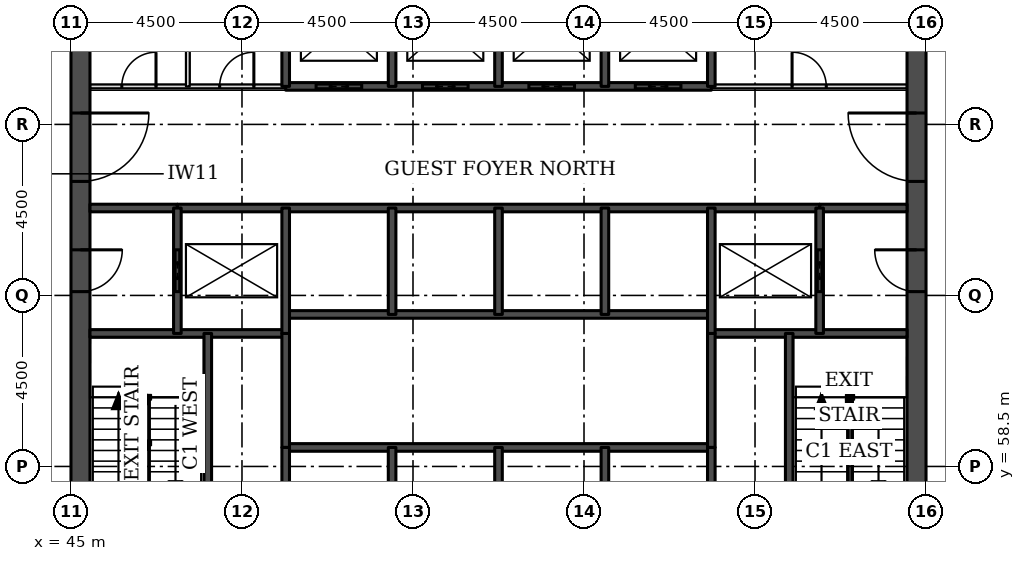
"""IFC4 building model, lengths in metres.
Left out: names, types, materials, properties, quantities, classifications, styles, units other than length and angle.
Written with IfcOpenShell. Run it as: python <this file> out.ifc"""

import sys

from ifc_helpers import new_model, si_unit, direction, frame, frame_2d, origin, place, context, subcontext, project, spatial, rectangle, extrude, element, fill, save


model = new_model("IFC4")
c1 = context("Model", 3, precision=1e-05, world=origin(), true_north=direction((0.0, 1.0)))
c2 = subcontext(c1, "Body", "Model", "MODEL_VIEW")
j1 = project(units=[si_unit("LENGTHUNIT", "METRE"), si_unit("PLANEANGLEUNIT", "RADIAN")], contexts=[c1])
p1 = place(None, origin())
s1 = spatial("IfcSite", under=j1, at=p1, CompositionType="ELEMENT")
p2 = place(p1, origin())
s2 = spatial("IfcBuilding", under=s1, at=p2, CompositionType="ELEMENT")
p3 = place(p2, frame((0.0, 0.0, 59.4)))
s3 = spatial("IfcBuildingStorey", under=s2, at=p3, CompositionType="ELEMENT", Elevation=59.4)
p4 = place(p3, frame((45.25, 49.5, 0.0), z_axis=(0.0, 0.0, 1.0), x_axis=(0.0, 1.0, 0.0)))
e1 = element("IfcWall", 1, at=p4, inside=s3, PredefinedType="SHEAR", context=c2, shape_type="SweptSolid", body=[
    extrude(rectangle(XDim=22.5, YDim=0.5, at=frame_2d((11.25, 0.0))), origin(), (0.0, 0.0, 1.0), 3.3),
])
p5 = place(p4, frame((4.2, 0.0, 0.0)))
e2 = element("IfcOpeningElement", 2, at=p5, cuts=e1, PredefinedType="OPENING", context=c2, shape_type="SweptSolid", body=[
    extrude(rectangle(XDim=1.8, YDim=2.1, at=frame_2d((0.9, 1.05))), frame((0.0, 0.26, 0.0), z_axis=(0.0, -1.0, 0.0), x_axis=(1.0, 0.0, 0.0)), (0.0, 0.0, 1.0), 0.52),
])
p6 = place(p4, frame((6.9, 0.0, 0.0)))
e3 = element("IfcOpeningElement", 3, at=p6, cuts=e1, PredefinedType="OPENING", context=c2, shape_type="SweptSolid", body=[
    extrude(rectangle(XDim=1.1, YDim=2.1, at=frame_2d((0.55, 1.05))), frame((0.0, 0.26, 0.0), z_axis=(0.0, -1.0, 0.0), x_axis=(1.0, 0.0, 0.0)), (0.0, 0.0, 1.0), 0.52),
])
p7 = place(p4, frame((13.6, 0.0, 0.0)))
e4 = element("IfcOpeningElement", 4, at=p7, cuts=e1, PredefinedType="OPENING", context=c2, shape_type="SweptSolid", body=[
    extrude(rectangle(XDim=1.1, YDim=2.1, at=frame_2d((0.55, 1.05))), frame((0.0, 0.26, 0.0), z_axis=(0.0, -1.0, 0.0), x_axis=(1.0, 0.0, 0.0)), (0.0, 0.0, 1.0), 0.52),
])
p8 = place(p4, frame((16.5, 0.0, 0.0)))
e5 = element("IfcOpeningElement", 5, at=p8, cuts=e1, PredefinedType="OPENING", context=c2, shape_type="SweptSolid", body=[
    extrude(rectangle(XDim=1.8, YDim=2.1, at=frame_2d((0.9, 1.05))), frame((0.0, 0.26, 0.0), z_axis=(0.0, -1.0, 0.0), x_axis=(1.0, 0.0, 0.0)), (0.0, 0.0, 1.0), 0.52),
])
p9 = place(p3, frame((67.25, 49.5, 0.0), z_axis=(0.0, 0.0, 1.0), x_axis=(0.0, 1.0, 0.0)))
e6 = element("IfcWall", 6, at=p9, inside=s3, PredefinedType="SHEAR", context=c2, shape_type="SweptSolid", body=[
    extrude(rectangle(XDim=22.5, YDim=0.5, at=frame_2d((11.25, 0.0))), origin(), (0.0, 0.0, 1.0), 3.3),
])
p10 = place(p9, frame((4.2, 0.0, 0.0)))
e7 = element("IfcOpeningElement", 7, at=p10, cuts=e6, PredefinedType="OPENING", context=c2, shape_type="SweptSolid", body=[
    extrude(rectangle(XDim=1.8, YDim=2.1, at=frame_2d((0.9, 1.05))), frame((0.0, 0.26, 0.0), z_axis=(0.0, -1.0, 0.0), x_axis=(1.0, 0.0, 0.0)), (0.0, 0.0, 1.0), 0.52),
])
p11 = place(p9, frame((6.9, 0.0, 0.0)))
e8 = element("IfcOpeningElement", 8, at=p11, cuts=e6, PredefinedType="OPENING", context=c2, shape_type="SweptSolid", body=[
    extrude(rectangle(XDim=1.1, YDim=2.1, at=frame_2d((0.55, 1.05))), frame((0.0, 0.26, 0.0), z_axis=(0.0, -1.0, 0.0), x_axis=(1.0, 0.0, 0.0)), (0.0, 0.0, 1.0), 0.52),
])
p12 = place(p9, frame((13.6, 0.0, 0.0)))
e9 = element("IfcOpeningElement", 9, at=p12, cuts=e6, PredefinedType="OPENING", context=c2, shape_type="SweptSolid", body=[
    extrude(rectangle(XDim=1.1, YDim=2.1, at=frame_2d((0.55, 1.05))), frame((0.0, 0.26, 0.0), z_axis=(0.0, -1.0, 0.0), x_axis=(1.0, 0.0, 0.0)), (0.0, 0.0, 1.0), 0.52),
])
p13 = place(p9, frame((16.5, 0.0, 0.0)))
e10 = element("IfcOpeningElement", 10, at=p13, cuts=e6, PredefinedType="OPENING", context=c2, shape_type="SweptSolid", body=[
    extrude(rectangle(XDim=1.8, YDim=2.1, at=frame_2d((0.9, 1.05))), frame((0.0, 0.26, 0.0), z_axis=(0.0, -1.0, 0.0), x_axis=(1.0, 0.0, 0.0)), (0.0, 0.0, 1.0), 0.52),
])
p14 = place(p3, frame((50.65, 59.0, 0.0), z_axis=(0.0, 0.0, 1.0), x_axis=(1.0, 0.0, 0.0)))
e11 = element("IfcWall", 11, at=p14, inside=s3, PredefinedType="SOLIDWALL", context=c2, shape_type="SweptSolid", body=[
    extrude(rectangle(XDim=11.2, YDim=0.2, at=frame_2d((5.6, 0.0))), origin(), (0.0, 0.0, 1.0), 3.3),
])
for number, where, z_axis, x_axis in (
    (12, (45.5, 62.0, 0.0), (0.0, 0.0, 1.0), (1.0, 0.0, 0.0)),
    (13, (61.85, 62.0, 0.0), (0.0, 0.0, 1.0), (1.0, 0.0, 0.0)),
):
    element("IfcWall", number, at=place(p3, frame(where, z_axis=z_axis, x_axis=x_axis)), inside=s3, PredefinedType="SOLIDWALL", context=c2, shape_type="SweptSolid", body=[
        extrude(rectangle(XDim=5.15, YDim=0.2, at=frame_2d((2.575, 0.0))), origin(), (0.0, 0.0, 1.0), 3.08),
    ])
p15 = place(p3, frame((50.65, 62.5, 0.0), z_axis=(0.0, 0.0, 1.0), x_axis=(1.0, 0.0, 0.0)))
e14 = element("IfcWall", 14, at=p15, inside=s3, PredefinedType="SOLIDWALL", context=c2, shape_type="SweptSolid", body=[
    extrude(rectangle(XDim=11.2, YDim=0.2, at=frame_2d((5.6, 0.0))), origin(), (0.0, 0.0, 1.0), 3.3),
])
for number, where, z_axis, x_axis in (
    (15, (45.5, 65.3, 0.0), (0.0, 0.0, 1.0), (1.0, 0.0, 0.0)),
    (16, (64.7, 65.3, 0.0), (0.0, 0.0, 1.0), (1.0, 0.0, 0.0)),
):
    element("IfcWall", number, at=place(p3, frame(where, z_axis=z_axis, x_axis=x_axis)), inside=s3, PredefinedType="SOLIDWALL", context=c2, shape_type="SweptSolid", body=[
        extrude(rectangle(XDim=2.3, YDim=0.2, at=frame_2d((1.15, 0.0))), origin(), (0.0, 0.0, 1.0), 3.08),
    ])
p16 = place(p3, frame((47.8, 65.3, 0.0), z_axis=(0.0, 0.0, 1.0), x_axis=(1.0, 0.0, 0.0)))
e17 = element("IfcWall", 17, at=p16, inside=s3, PredefinedType="SOLIDWALL", context=c2, shape_type="SweptSolid", body=[
    extrude(rectangle(XDim=16.9, YDim=0.2, at=frame_2d((8.45, 0.0))), origin(), (0.0, 0.0, 1.0), 3.08),
])
p17 = place(p3, frame((45.5, 68.5, 0.0), z_axis=(0.0, 0.0, 1.0), x_axis=(1.0, 0.0, 0.0)))
e18 = element("IfcWall", 18, at=p17, inside=s3, PredefinedType="PARTITIONING", context=c2, shape_type="SweptSolid", body=[
    extrude(rectangle(XDim=5.15, YDim=0.1, at=frame_2d((2.575, 0.0))), origin(), (0.0, 0.0, 1.0), 3.08),
])
p18 = place(p17, frame((0.837, 0.0, 0.0)))
e19 = element("IfcOpeningElement", 19, at=p18, cuts=e18, PredefinedType="OPENING", context=c2, shape_type="SweptSolid", body=[
    extrude(rectangle(XDim=0.9, YDim=2.1, at=frame_2d((0.45, 1.05))), frame((0.0, 0.06, 0.0), z_axis=(0.0, -1.0, 0.0), x_axis=(1.0, 0.0, 0.0)), (0.0, 0.0, 1.0), 0.12),
])
p19 = place(p17, frame((3.413, 0.0, 0.0)))
e20 = element("IfcOpeningElement", 20, at=p19, cuts=e18, PredefinedType="OPENING", context=c2, shape_type="SweptSolid", body=[
    extrude(rectangle(XDim=0.9, YDim=2.1, at=frame_2d((0.45, 1.05))), frame((0.0, 0.06, 0.0), z_axis=(0.0, -1.0, 0.0), x_axis=(1.0, 0.0, 0.0)), (0.0, 0.0, 1.0), 0.12),
])
p20 = place(p3, frame((61.85, 68.5, 0.0), z_axis=(0.0, 0.0, 1.0), x_axis=(1.0, 0.0, 0.0)))
e21 = element("IfcWall", 21, at=p20, inside=s3, PredefinedType="PARTITIONING", context=c2, shape_type="SweptSolid", body=[
    extrude(rectangle(XDim=5.15, YDim=0.1, at=frame_2d((2.575, 0.0))), origin(), (0.0, 0.0, 1.0), 3.08),
])
p21 = place(p20, frame((2.125, 0.0, 0.0)))
e22 = element("IfcOpeningElement", 22, at=p21, cuts=e21, PredefinedType="OPENING", context=c2, shape_type="SweptSolid", body=[
    extrude(rectangle(XDim=0.9, YDim=2.1, at=frame_2d((0.45, 1.05))), frame((0.0, 0.06, 0.0), z_axis=(0.0, -1.0, 0.0), x_axis=(1.0, 0.0, 0.0)), (0.0, 0.0, 1.0), 0.12),
])
p22 = place(p3, frame((50.65, 68.5, 0.0), z_axis=(0.0, 0.0, 1.0), x_axis=(1.0, 0.0, 0.0)))
e23 = element("IfcWall", 23, at=p22, inside=s3, PredefinedType="SOLIDWALL", context=c2, shape_type="SweptSolid", body=[
    extrude(rectangle(XDim=11.2, YDim=0.2, at=frame_2d((5.6, 0.0))), origin(), (0.0, 0.0, 1.0), 3.08),
])
p23 = place(p22, frame((0.8, 0.0, 0.0)))
e24 = element("IfcOpeningElement", 24, at=p23, cuts=e23, PredefinedType="OPENING", context=c2, shape_type="SweptSolid", body=[
    extrude(rectangle(XDim=1.2, YDim=2.1, at=frame_2d((0.6, 1.05))), frame((0.0, 0.11, 0.0), z_axis=(0.0, -1.0, 0.0), x_axis=(1.0, 0.0, 0.0)), (0.0, 0.0, 1.0), 0.22),
])
p24 = place(p22, frame((3.6, 0.0, 0.0)))
e25 = element("IfcOpeningElement", 25, at=p24, cuts=e23, PredefinedType="OPENING", context=c2, shape_type="SweptSolid", body=[
    extrude(rectangle(XDim=1.2, YDim=2.1, at=frame_2d((0.6, 1.05))), frame((0.0, 0.11, 0.0), z_axis=(0.0, -1.0, 0.0), x_axis=(1.0, 0.0, 0.0)), (0.0, 0.0, 1.0), 0.22),
])
p25 = place(p22, frame((6.4, 0.0, 0.0)))
e26 = element("IfcOpeningElement", 26, at=p25, cuts=e23, PredefinedType="OPENING", context=c2, shape_type="SweptSolid", body=[
    extrude(rectangle(XDim=1.2, YDim=2.1, at=frame_2d((0.6, 1.05))), frame((0.0, 0.11, 0.0), z_axis=(0.0, -1.0, 0.0), x_axis=(1.0, 0.0, 0.0)), (0.0, 0.0, 1.0), 0.22),
])
p26 = place(p22, frame((9.2, 0.0, 0.0)))
e27 = element("IfcOpeningElement", 27, at=p26, cuts=e23, PredefinedType="OPENING", context=c2, shape_type="SweptSolid", body=[
    extrude(rectangle(XDim=1.2, YDim=2.1, at=frame_2d((0.6, 1.05))), frame((0.0, 0.11, 0.0), z_axis=(0.0, -1.0, 0.0), x_axis=(1.0, 0.0, 0.0)), (0.0, 0.0, 1.0), 0.22),
])
p27 = place(p3, frame((47.8, 62.0, 0.0), z_axis=(0.0, 0.0, 1.0), x_axis=(0.0, 1.0, 0.0)))
e28 = element("IfcWall", 28, at=p27, inside=s3, PredefinedType="SOLIDWALL", context=c2, shape_type="SweptSolid", body=[
    extrude(rectangle(XDim=3.3, YDim=0.2, at=frame_2d((1.65, 0.0))), origin(), (0.0, 0.0, 1.0), 3.08),
])
p28 = place(p27, frame((1.1, 0.0, 0.0)))
e29 = element("IfcOpeningElement", 29, at=p28, cuts=e28, PredefinedType="OPENING", context=c2, shape_type="SweptSolid", body=[
    extrude(rectangle(XDim=1.1, YDim=2.1, at=frame_2d((0.55, 1.05))), frame((0.0, 0.11, 0.0), z_axis=(0.0, -1.0, 0.0), x_axis=(1.0, 0.0, 0.0)), (0.0, 0.0, 1.0), 0.22),
])
p29 = place(p3, frame((48.075, 68.5, 0.0), z_axis=(0.0, 0.0, 1.0), x_axis=(0.0, 1.0, 0.0)))
e30 = element("IfcWall", 30, at=p29, inside=s3, PredefinedType="PARTITIONING", context=c2, shape_type="SweptSolid", body=[
    extrude(rectangle(XDim=3.0, YDim=0.1, at=frame_2d((1.5, 0.0))), origin(), (0.0, 0.0, 1.0), 3.08),
])
p30 = place(p3, frame((48.6, 56.2, 0.0), z_axis=(0.0, 0.0, 1.0), x_axis=(0.0, 1.0, 0.0)))
e31 = element("IfcWall", 31, at=p30, inside=s3, PredefinedType="SOLIDWALL", context=c2, shape_type="SweptSolid", body=[
    extrude(rectangle(XDim=5.8, YDim=0.2, at=frame_2d((2.9, 0.0))), origin(), (0.0, 0.0, 1.0), 3.08),
])
p31 = place(p3, frame((50.65, 59.0, 0.0), z_axis=(0.0, 0.0, 1.0), x_axis=(0.0, 1.0, 0.0)))
e32 = element("IfcWall", 32, at=p31, inside=s3, PredefinedType="SOLIDWALL", context=c2, shape_type="SweptSolid", body=[
    extrude(rectangle(XDim=3.0, YDim=0.2, at=frame_2d((1.5, 0.0))), origin(), (0.0, 0.0, 1.0), 3.3),
])
p32 = place(p3, frame((50.65, 56.2, 0.0), z_axis=(0.0, 0.0, 1.0), x_axis=(0.0, 1.0, 0.0)))
e33 = element("IfcWall", 33, at=p32, inside=s3, PredefinedType="SOLIDWALL", context=c2, shape_type="SweptSolid", body=[
    extrude(rectangle(XDim=2.8, YDim=0.2, at=frame_2d((1.4, 0.0))), origin(), (0.0, 0.0, 1.0), 3.08),
])
p33 = place(p3, frame((50.65, 62.0, 0.0), z_axis=(0.0, 0.0, 1.0), x_axis=(0.0, 1.0, 0.0)))
e34 = element("IfcWall", 34, at=p33, inside=s3, PredefinedType="SOLIDWALL", context=c2, shape_type="SweptSolid", body=[
    extrude(rectangle(XDim=3.3, YDim=0.2, at=frame_2d((1.65, 0.0))), origin(), (0.0, 0.0, 1.0), 3.08),
])
p34 = place(p3, frame((50.65, 68.5, 0.0), z_axis=(0.0, 0.0, 1.0), x_axis=(0.0, 1.0, 0.0)))
e35 = element("IfcWall", 35, at=p34, inside=s3, PredefinedType="SOLIDWALL", context=c2, shape_type="SweptSolid", body=[
    extrude(rectangle(XDim=3.0, YDim=0.2, at=frame_2d((1.5, 0.0))), origin(), (0.0, 0.0, 1.0), 3.08),
])
for number, where, z_axis, x_axis in (
    (36, (53.45, 56.2, 0.0), (0.0, 0.0, 1.0), (0.0, 1.0, 0.0)),
    (37, (53.45, 62.5, 0.0), (0.0, 0.0, 1.0), (0.0, 1.0, 0.0)),
):
    element("IfcWall", number, at=place(p3, frame(where, z_axis=z_axis, x_axis=x_axis)), inside=s3, PredefinedType="SOLIDWALL", context=c2, shape_type="SweptSolid", body=[
        extrude(rectangle(XDim=2.8, YDim=0.2, at=frame_2d((1.4, 0.0))), origin(), (0.0, 0.0, 1.0), 3.08),
    ])
p35 = place(p3, frame((53.45, 68.5, 0.0), z_axis=(0.0, 0.0, 1.0), x_axis=(0.0, 1.0, 0.0)))
e38 = element("IfcWall", 38, at=p35, inside=s3, PredefinedType="SOLIDWALL", context=c2, shape_type="SweptSolid", body=[
    extrude(rectangle(XDim=3.0, YDim=0.2, at=frame_2d((1.5, 0.0))), origin(), (0.0, 0.0, 1.0), 3.08),
])
for number, where, z_axis, x_axis in (
    (39, (56.25, 56.2, 0.0), (0.0, 0.0, 1.0), (0.0, 1.0, 0.0)),
    (40, (56.25, 62.5, 0.0), (0.0, 0.0, 1.0), (0.0, 1.0, 0.0)),
):
    element("IfcWall", number, at=place(p3, frame(where, z_axis=z_axis, x_axis=x_axis)), inside=s3, PredefinedType="SOLIDWALL", context=c2, shape_type="SweptSolid", body=[
        extrude(rectangle(XDim=2.8, YDim=0.2, at=frame_2d((1.4, 0.0))), origin(), (0.0, 0.0, 1.0), 3.08),
    ])
p36 = place(p3, frame((56.25, 68.5, 0.0), z_axis=(0.0, 0.0, 1.0), x_axis=(0.0, 1.0, 0.0)))
e41 = element("IfcWall", 41, at=p36, inside=s3, PredefinedType="SOLIDWALL", context=c2, shape_type="SweptSolid", body=[
    extrude(rectangle(XDim=3.0, YDim=0.2, at=frame_2d((1.5, 0.0))), origin(), (0.0, 0.0, 1.0), 3.08),
])
for number, where, z_axis, x_axis in (
    (42, (59.05, 56.2, 0.0), (0.0, 0.0, 1.0), (0.0, 1.0, 0.0)),
    (43, (59.05, 62.5, 0.0), (0.0, 0.0, 1.0), (0.0, 1.0, 0.0)),
):
    element("IfcWall", number, at=place(p3, frame(where, z_axis=z_axis, x_axis=x_axis)), inside=s3, PredefinedType="SOLIDWALL", context=c2, shape_type="SweptSolid", body=[
        extrude(rectangle(XDim=2.8, YDim=0.2, at=frame_2d((1.4, 0.0))), origin(), (0.0, 0.0, 1.0), 3.08),
    ])
p37 = place(p3, frame((59.05, 68.5, 0.0), z_axis=(0.0, 0.0, 1.0), x_axis=(0.0, 1.0, 0.0)))
e44 = element("IfcWall", 44, at=p37, inside=s3, PredefinedType="SOLIDWALL", context=c2, shape_type="SweptSolid", body=[
    extrude(rectangle(XDim=3.0, YDim=0.2, at=frame_2d((1.5, 0.0))), origin(), (0.0, 0.0, 1.0), 3.08),
])
p38 = place(p3, frame((61.85, 59.0, 0.0), z_axis=(0.0, 0.0, 1.0), x_axis=(0.0, 1.0, 0.0)))
e45 = element("IfcWall", 45, at=p38, inside=s3, PredefinedType="SOLIDWALL", context=c2, shape_type="SweptSolid", body=[
    extrude(rectangle(XDim=3.0, YDim=0.2, at=frame_2d((1.5, 0.0))), origin(), (0.0, 0.0, 1.0), 3.3),
])
p39 = place(p3, frame((61.85, 56.2, 0.0), z_axis=(0.0, 0.0, 1.0), x_axis=(0.0, 1.0, 0.0)))
e46 = element("IfcWall", 46, at=p39, inside=s3, PredefinedType="SOLIDWALL", context=c2, shape_type="SweptSolid", body=[
    extrude(rectangle(XDim=2.8, YDim=0.2, at=frame_2d((1.4, 0.0))), origin(), (0.0, 0.0, 1.0), 3.08),
])
p40 = place(p3, frame((61.85, 62.0, 0.0), z_axis=(0.0, 0.0, 1.0), x_axis=(0.0, 1.0, 0.0)))
e47 = element("IfcWall", 47, at=p40, inside=s3, PredefinedType="SOLIDWALL", context=c2, shape_type="SweptSolid", body=[
    extrude(rectangle(XDim=3.3, YDim=0.2, at=frame_2d((1.65, 0.0))), origin(), (0.0, 0.0, 1.0), 3.08),
])
p41 = place(p3, frame((61.85, 68.5, 0.0), z_axis=(0.0, 0.0, 1.0), x_axis=(0.0, 1.0, 0.0)))
e48 = element("IfcWall", 48, at=p41, inside=s3, PredefinedType="SOLIDWALL", context=c2, shape_type="SweptSolid", body=[
    extrude(rectangle(XDim=3.0, YDim=0.2, at=frame_2d((1.5, 0.0))), origin(), (0.0, 0.0, 1.0), 3.08),
])
p42 = place(p3, frame((63.9, 56.2, 0.0), z_axis=(0.0, 0.0, 1.0), x_axis=(0.0, 1.0, 0.0)))
e49 = element("IfcWall", 49, at=p42, inside=s3, PredefinedType="SOLIDWALL", context=c2, shape_type="SweptSolid", body=[
    extrude(rectangle(XDim=5.8, YDim=0.2, at=frame_2d((2.9, 0.0))), origin(), (0.0, 0.0, 1.0), 3.08),
])
p43 = place(p3, frame((64.7, 62.0, 0.0), z_axis=(0.0, 0.0, 1.0), x_axis=(0.0, 1.0, 0.0)))
e50 = element("IfcWall", 50, at=p43, inside=s3, PredefinedType="SOLIDWALL", context=c2, shape_type="SweptSolid", body=[
    extrude(rectangle(XDim=3.3, YDim=0.2, at=frame_2d((1.65, 0.0))), origin(), (0.0, 0.0, 1.0), 3.08),
])
p44 = place(p43, frame((1.1, 0.0, 0.0)))
e51 = element("IfcOpeningElement", 51, at=p44, cuts=e50, PredefinedType="OPENING", context=c2, shape_type="SweptSolid", body=[
    extrude(rectangle(XDim=1.1, YDim=2.1, at=frame_2d((0.55, 1.05))), frame((0.0, 0.11, 0.0), z_axis=(0.0, -1.0, 0.0), x_axis=(1.0, 0.0, 0.0)), (0.0, 0.0, 1.0), 0.22),
])
p45 = place(p23, origin())
e52 = element("IfcDoor", 52, at=p45, inside=s3, OperationType="DOUBLE_DOOR_SLIDING", PredefinedType="DOOR", context=c2, shape_type="SweptSolid", body=[
    extrude(rectangle(XDim=1.2, YDim=2.1, at=frame_2d((0.6, 1.05))), frame((0.0, 0.025, 0.0), z_axis=(0.0, -1.0, 0.0), x_axis=(1.0, 0.0, 0.0)), (0.0, 0.0, 1.0), 0.05),
])
fill(e24, e52)
p46 = place(p24, origin())
e53 = element("IfcDoor", 53, at=p46, inside=s3, OperationType="DOUBLE_DOOR_SLIDING", PredefinedType="DOOR", context=c2, shape_type="SweptSolid", body=[
    extrude(rectangle(XDim=1.2, YDim=2.1, at=frame_2d((0.6, 1.05))), frame((0.0, 0.025, 0.0), z_axis=(0.0, -1.0, 0.0), x_axis=(1.0, 0.0, 0.0)), (0.0, 0.0, 1.0), 0.05),
])
fill(e25, e53)
p47 = place(p25, origin())
e54 = element("IfcDoor", 54, at=p47, inside=s3, OperationType="DOUBLE_DOOR_SLIDING", PredefinedType="DOOR", context=c2, shape_type="SweptSolid", body=[
    extrude(rectangle(XDim=1.2, YDim=2.1, at=frame_2d((0.6, 1.05))), frame((0.0, 0.025, 0.0), z_axis=(0.0, -1.0, 0.0), x_axis=(1.0, 0.0, 0.0)), (0.0, 0.0, 1.0), 0.05),
])
fill(e26, e54)
p48 = place(p26, origin())
e55 = element("IfcDoor", 55, at=p48, inside=s3, OperationType="DOUBLE_DOOR_SLIDING", PredefinedType="DOOR", context=c2, shape_type="SweptSolid", body=[
    extrude(rectangle(XDim=1.2, YDim=2.1, at=frame_2d((0.6, 1.05))), frame((0.0, 0.025, 0.0), z_axis=(0.0, -1.0, 0.0), x_axis=(1.0, 0.0, 0.0)), (0.0, 0.0, 1.0), 0.05),
])
fill(e27, e55)
p49 = place(p28, origin())
e56 = element("IfcDoor", 56, at=p49, inside=s3, OperationType="DOUBLE_DOOR_SLIDING", PredefinedType="DOOR", context=c2, shape_type="SweptSolid", body=[
    extrude(rectangle(XDim=1.1, YDim=2.1, at=frame_2d((0.55, 1.05))), frame((0.0, 0.025, 0.0), z_axis=(0.0, -1.0, 0.0), x_axis=(1.0, 0.0, 0.0)), (0.0, 0.0, 1.0), 0.05),
])
fill(e29, e56)
p50 = place(p44, origin())
e57 = element("IfcDoor", 57, at=p50, inside=s3, OperationType="DOUBLE_DOOR_SLIDING", PredefinedType="DOOR", context=c2, shape_type="SweptSolid", body=[
    extrude(rectangle(XDim=1.1, YDim=2.1, at=frame_2d((0.55, 1.05))), frame((0.0, 0.025, 0.0), z_axis=(0.0, -1.0, 0.0), x_axis=(1.0, 0.0, 0.0)), (0.0, 0.0, 1.0), 0.05),
])
fill(e51, e57)
p51 = place(p7, frame((1.1, 0.0, 0.0), z_axis=(0.0, 0.0, 1.0), x_axis=(-1.0, 0.0, 0.0)))
e58 = element("IfcDoor", 58, at=p51, inside=s3, OperationType="SINGLE_SWING_LEFT", PredefinedType="DOOR", context=c2, shape_type="SweptSolid", body=[
    extrude(rectangle(XDim=1.1, YDim=2.1, at=frame_2d((0.55, 1.05))), frame((0.0, 0.025, 0.0), z_axis=(0.0, -1.0, 0.0), x_axis=(1.0, 0.0, 0.0)), (0.0, 0.0, 1.0), 0.05),
])
fill(e4, e58)
p52 = place(p8, frame((1.8, 0.0, 0.0), z_axis=(0.0, 0.0, 1.0), x_axis=(-1.0, 0.0, 0.0)))
e59 = element("IfcDoor", 59, at=p52, inside=s3, OperationType="SINGLE_SWING_LEFT", PredefinedType="DOOR", context=c2, shape_type="SweptSolid", body=[
    extrude(rectangle(XDim=1.8, YDim=2.1, at=frame_2d((0.9, 1.05))), frame((0.0, 0.025, 0.0), z_axis=(0.0, -1.0, 0.0), x_axis=(1.0, 0.0, 0.0)), (0.0, 0.0, 1.0), 0.05),
])
fill(e5, e59)
p53 = place(p12, origin())
e60 = element("IfcDoor", 60, at=p53, inside=s3, OperationType="SINGLE_SWING_RIGHT", PredefinedType="DOOR", context=c2, shape_type="SweptSolid", body=[
    extrude(rectangle(XDim=1.1, YDim=2.1, at=frame_2d((0.55, 1.05))), frame((0.0, 0.025, 0.0), z_axis=(0.0, -1.0, 0.0), x_axis=(1.0, 0.0, 0.0)), (0.0, 0.0, 1.0), 0.05),
])
fill(e9, e60)
p54 = place(p13, origin())
e61 = element("IfcDoor", 61, at=p54, inside=s3, OperationType="SINGLE_SWING_RIGHT", PredefinedType="DOOR", context=c2, shape_type="SweptSolid", body=[
    extrude(rectangle(XDim=1.8, YDim=2.1, at=frame_2d((0.9, 1.05))), frame((0.0, 0.025, 0.0), z_axis=(0.0, -1.0, 0.0), x_axis=(1.0, 0.0, 0.0)), (0.0, 0.0, 1.0), 0.05),
])
fill(e10, e61)
p55 = place(p21, origin())
e62 = element("IfcDoor", 62, at=p55, inside=s3, OperationType="SINGLE_SWING_LEFT", PredefinedType="DOOR", context=c2, shape_type="SweptSolid", body=[
    extrude(rectangle(XDim=0.9, YDim=2.1, at=frame_2d((0.45, 1.05))), frame((0.0, 0.025, 0.0), z_axis=(0.0, -1.0, 0.0), x_axis=(1.0, 0.0, 0.0)), (0.0, 0.0, 1.0), 0.05),
])
fill(e22, e62)
p56 = place(p18, origin())
e63 = element("IfcDoor", 63, at=p56, inside=s3, OperationType="SINGLE_SWING_RIGHT", PredefinedType="DOOR", context=c2, shape_type="SweptSolid", body=[
    extrude(rectangle(XDim=0.9, YDim=2.1, at=frame_2d((0.45, 1.05))), frame((0.0, 0.025, 0.0), z_axis=(0.0, -1.0, 0.0), x_axis=(1.0, 0.0, 0.0)), (0.0, 0.0, 1.0), 0.05),
])
fill(e19, e63)
p57 = place(p19, origin())
e64 = element("IfcDoor", 64, at=p57, inside=s3, OperationType="SINGLE_SWING_RIGHT", PredefinedType="DOOR", context=c2, shape_type="SweptSolid", body=[
    extrude(rectangle(XDim=0.9, YDim=2.1, at=frame_2d((0.45, 1.05))), frame((0.0, 0.025, 0.0), z_axis=(0.0, -1.0, 0.0), x_axis=(1.0, 0.0, 0.0)), (0.0, 0.0, 1.0), 0.05),
])
fill(e20, e64)
save(model, sys.argv[1])
